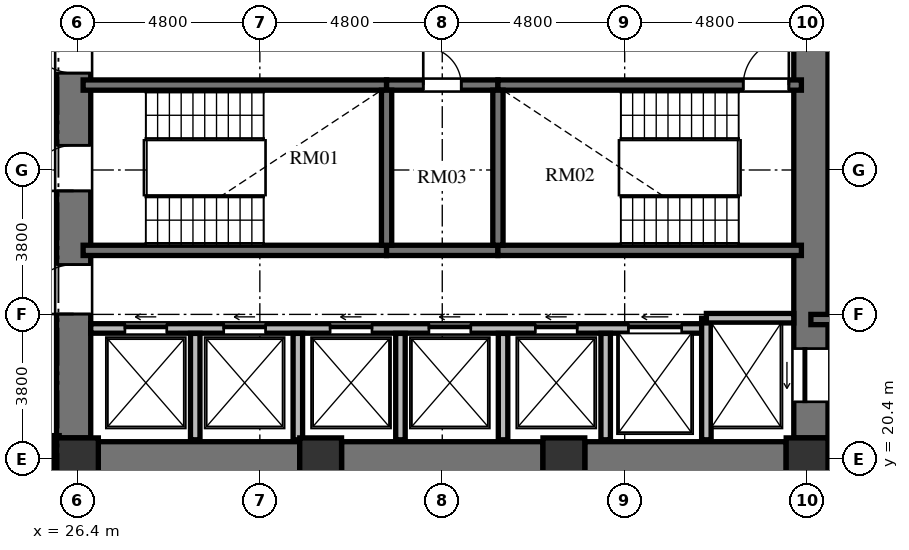
"""IFC4 building model, lengths in metres.
Left out: names, types, materials, properties, quantities, classifications, styles, units other than length and angle.
Written with IfcOpenShell. Run it as: python <this file> out.ifc"""

import sys

from ifc_helpers import new_model, si_unit, direction, frame, frame_2d, origin, origin_2d, place, context, subcontext, project, spatial, rectangle, extrude, element, fill, save


model = new_model("IFC4")
c1 = context("Model", 3, precision=1e-05, world=origin(), true_north=direction((0.0, 1.0)))
c2 = subcontext(c1, "Body", "Model", "MODEL_VIEW")
j1 = project(units=[si_unit("LENGTHUNIT", "METRE"), si_unit("PLANEANGLEUNIT", "RADIAN")], contexts=[c1])
p1 = place(None, origin())
s1 = spatial("IfcSite", under=j1, at=p1, CompositionType="ELEMENT")
p2 = place(p1, origin())
s2 = spatial("IfcBuilding", under=s1, at=p2, CompositionType="ELEMENT")
p3 = place(p2, frame((0.0, 0.0, 47.088)))
s3 = spatial("IfcBuildingStorey", under=s2, at=p3, CompositionType="ELEMENT", Elevation=47.088)
for number, where, z_axis, x_axis in (
    (1, (26.4, 20.4, 0.0), (0.0, 0.0, 1.0), (1.0, 0.0, 0.0)),
    (2, (32.8, 20.4, 0.0), (0.0, 0.0, 1.0), (1.0, 0.0, 0.0)),
    (3, (39.2, 20.4, 0.0), (0.0, 0.0, 1.0), (1.0, 0.0, 0.0)),
    (4, (45.6, 20.4, 0.0), (0.0, 0.0, 1.0), (1.0, 0.0, 0.0)),
):
    element("IfcColumn", number, at=place(p3, frame(where, z_axis=z_axis, x_axis=x_axis)), inside=s3, PredefinedType="COLUMN", context=c2, shape_type="SweptSolid", body=[
        extrude(rectangle(XDim=1.1, YDim=1.1, at=origin_2d()), origin(), (0.0, 0.0, 1.0), 3.648),
    ])
p4 = place(p3, frame((26.3, 20.95, 0.0), z_axis=(0.0, 0.0, 1.0), x_axis=(0.0, 1.0, 0.0)))
e5 = element("IfcWall", 5, at=p4, inside=s3, PredefinedType="SHEAR", context=c2, shape_type="SweptSolid", body=[
    extrude(rectangle(XDim=14.1, YDim=0.9, at=frame_2d((7.05, 0.0))), origin(), (0.0, 0.0, 1.0), 3.648),
])
p5 = place(p4, frame((6.5, 0.0, 0.0)))
e6 = element("IfcOpeningElement", 6, at=p5, cuts=e5, PredefinedType="OPENING", context=c2, shape_type="SweptSolid", body=[
    extrude(rectangle(XDim=1.2, YDim=2.15, at=frame_2d((0.6, 1.075))), frame((0.0, 0.46, 0.0), z_axis=(0.0, -1.0, 0.0), x_axis=(1.0, 0.0, 0.0)), (0.0, 0.0, 1.0), 0.92),
])
p6 = place(p4, frame((9.6, 0.0, 0.0)))
e7 = element("IfcOpeningElement", 7, at=p6, cuts=e5, PredefinedType="OPENING", context=c2, shape_type="SweptSolid", body=[
    extrude(rectangle(XDim=1.3, YDim=2.2, at=frame_2d((0.65, 1.1))), frame((0.0, 0.46, 0.0), z_axis=(0.0, -1.0, 0.0), x_axis=(1.0, 0.0, 0.0)), (0.0, 0.0, 1.0), 0.92),
])
p7 = place(p4, frame((3.26, 0.0, 0.0)))
e8 = element("IfcOpeningElement", 8, at=p7, cuts=e5, PredefinedType="OPENING", context=c2, shape_type="SweptSolid", body=[
    extrude(rectangle(XDim=1.3, YDim=2.2, at=frame_2d((0.65, 1.1))), frame((0.0, 0.46, 0.0), z_axis=(0.0, -1.0, 0.0), x_axis=(1.0, 0.0, 0.0)), (0.0, 0.0, 1.0), 0.92),
])
p8 = place(p3, frame((45.7, 20.95, 0.0), z_axis=(0.0, 0.0, 1.0), x_axis=(0.0, 1.0, 0.0)))
e9 = element("IfcWall", 9, at=p8, inside=s3, PredefinedType="SHEAR", context=c2, shape_type="SweptSolid", body=[
    extrude(rectangle(XDim=14.1, YDim=0.9, at=frame_2d((7.05, 0.0))), origin(), (0.0, 0.0, 1.0), 3.648),
])
p9 = place(p8, frame((11.75, 0.0, 0.0)))
e10 = element("IfcOpeningElement", 10, at=p9, cuts=e9, PredefinedType="OPENING", context=c2, shape_type="SweptSolid", body=[
    extrude(rectangle(XDim=1.4, YDim=2.3, at=frame_2d((0.7, 1.15))), frame((0.0, 0.46, 0.0), z_axis=(0.0, -1.0, 0.0), x_axis=(1.0, 0.0, 0.0)), (0.0, 0.0, 1.0), 0.92),
])
p10 = place(p8, frame((0.95, 0.0, 0.0)))
e11 = element("IfcOpeningElement", 11, at=p10, cuts=e9, PredefinedType="OPENING", context=c2, shape_type="SweptSolid", body=[
    extrude(rectangle(XDim=1.4, YDim=2.3, at=frame_2d((0.7, 1.15))), frame((0.0, 0.46, 0.0), z_axis=(0.0, -1.0, 0.0), x_axis=(1.0, 0.0, 0.0)), (0.0, 0.0, 1.0), 0.92),
])
p11 = place(p3, frame((26.95, 20.4, 0.0), z_axis=(0.0, 0.0, 1.0), x_axis=(1.0, 0.0, 0.0)))
e12 = element("IfcWall", 12, at=p11, inside=s3, PredefinedType="SHEAR", context=c2, shape_type="SweptSolid", body=[
    extrude(rectangle(XDim=5.3, YDim=0.9, at=frame_2d((2.65, 0.0))), origin(), (0.0, 0.0, 1.0), 3.648),
])
p12 = place(p3, frame((33.35, 20.4, 0.0), z_axis=(0.0, 0.0, 1.0), x_axis=(1.0, 0.0, 0.0)))
e13 = element("IfcWall", 13, at=p12, inside=s3, PredefinedType="SHEAR", context=c2, shape_type="SweptSolid", body=[
    extrude(rectangle(XDim=5.3, YDim=0.9, at=frame_2d((2.65, 0.0))), origin(), (0.0, 0.0, 1.0), 3.648),
])
p13 = place(p3, frame((39.75, 20.4, 0.0), z_axis=(0.0, 0.0, 1.0), x_axis=(1.0, 0.0, 0.0)))
e14 = element("IfcWall", 14, at=p13, inside=s3, PredefinedType="SHEAR", context=c2, shape_type="SweptSolid", body=[
    extrude(rectangle(XDim=5.3, YDim=0.9, at=frame_2d((2.65, 0.0))), origin(), (0.0, 0.0, 1.0), 3.648),
])
p14 = place(p3, frame((26.55, 30.235, 0.0), z_axis=(0.0, 0.0, 1.0), x_axis=(1.0, 0.0, 0.0)))
e15 = element("IfcWall", 15, at=p14, inside=s3, PredefinedType="SHEAR", context=c2, shape_type="SweptSolid", body=[
    extrude(rectangle(XDim=7.985, YDim=0.27, at=frame_2d((3.992, 0.0))), origin(), (0.0, 0.0, 1.0), 3.648),
])
p15 = place(p3, frame((34.535, 30.235, 0.0), z_axis=(0.0, 0.0, 1.0), x_axis=(1.0, 0.0, 0.0)))
e16 = element("IfcWall", 16, at=p15, inside=s3, PredefinedType="SHEAR", context=c2, shape_type="SweptSolid", body=[
    extrude(rectangle(XDim=2.93, YDim=0.27, at=frame_2d((1.465, 0.0))), origin(), (0.0, 0.0, 1.0), 3.648),
])
p16 = place(p15, frame((0.965, 0.0, 0.0)))
e17 = element("IfcOpeningElement", 17, at=p16, cuts=e16, PredefinedType="OPENING", context=c2, shape_type="SweptSolid", body=[
    extrude(rectangle(XDim=1.0, YDim=2.1, at=frame_2d((0.5, 1.05))), frame((0.0, 0.145, 0.0), z_axis=(0.0, -1.0, 0.0), x_axis=(1.0, 0.0, 0.0)), (0.0, 0.0, 1.0), 0.29),
])
p17 = place(p3, frame((37.465, 30.235, 0.0), z_axis=(0.0, 0.0, 1.0), x_axis=(1.0, 0.0, 0.0)))
e18 = element("IfcWall", 18, at=p17, inside=s3, PredefinedType="SHEAR", context=c2, shape_type="SweptSolid", body=[
    extrude(rectangle(XDim=7.985, YDim=0.27, at=frame_2d((3.992, 0.0))), origin(), (0.0, 0.0, 1.0), 3.648),
])
p18 = place(p17, frame((6.455, 0.0, 0.0)))
e19 = element("IfcOpeningElement", 19, at=p18, cuts=e18, PredefinedType="OPENING", context=c2, shape_type="SweptSolid", body=[
    extrude(rectangle(XDim=1.2, YDim=2.15, at=frame_2d((0.6, 1.075))), frame((0.0, 0.145, 0.0), z_axis=(0.0, -1.0, 0.0), x_axis=(1.0, 0.0, 0.0)), (0.0, 0.0, 1.0), 0.29),
])
p19 = place(p3, frame((26.55, 25.885, 0.0), z_axis=(0.0, 0.0, 1.0), x_axis=(1.0, 0.0, 0.0)))
e20 = element("IfcWall", 20, at=p19, inside=s3, PredefinedType="SHEAR", context=c2, shape_type="SweptSolid", body=[
    extrude(rectangle(XDim=7.985, YDim=0.27, at=frame_2d((3.992, 0.0))), origin(), (0.0, 0.0, 1.0), 3.648),
])
p20 = place(p3, frame((34.535, 25.885, 0.0), z_axis=(0.0, 0.0, 1.0), x_axis=(1.0, 0.0, 0.0)))
e21 = element("IfcWall", 21, at=p20, inside=s3, PredefinedType="SHEAR", context=c2, shape_type="SweptSolid", body=[
    extrude(rectangle(XDim=2.93, YDim=0.27, at=frame_2d((1.465, 0.0))), origin(), (0.0, 0.0, 1.0), 3.648),
])
p21 = place(p3, frame((37.465, 25.885, 0.0), z_axis=(0.0, 0.0, 1.0), x_axis=(1.0, 0.0, 0.0)))
e22 = element("IfcWall", 22, at=p21, inside=s3, PredefinedType="SHEAR", context=c2, shape_type="SweptSolid", body=[
    extrude(rectangle(XDim=7.985, YDim=0.27, at=frame_2d((3.992, 0.0))), origin(), (0.0, 0.0, 1.0), 3.648),
])
for number, where, z_axis, x_axis in (
    (23, (34.535, 26.02, 0.0), (0.0, 0.0, 1.0), (0.0, 1.0, 0.0)),
    (24, (37.465, 26.02, 0.0), (0.0, 0.0, 1.0), (0.0, 1.0, 0.0)),
):
    element("IfcWall", number, at=place(p3, frame(where, z_axis=z_axis, x_axis=x_axis)), inside=s3, PredefinedType="SHEAR", context=c2, shape_type="SweptSolid", body=[
        extrude(rectangle(XDim=4.08, YDim=0.27, at=frame_2d((2.04, 0.0))), origin(), (0.0, 0.0, 1.0), 3.648),
    ])
p22 = place(p3, frame((26.75, 23.83, 0.0), z_axis=(0.0, 0.0, 1.0), x_axis=(1.0, 0.0, 0.0)))
e25 = element("IfcWall", 25, at=p22, inside=s3, PredefinedType="SOLIDWALL", context=c2, shape_type="SweptSolid", body=[
    extrude(rectangle(XDim=16.2, YDim=0.25, at=frame_2d((8.1, 0.0))), origin(), (0.0, 0.0, 1.0), 3.428),
])
p23 = place(p22, frame((0.9, 0.0, 0.0)))
e26 = element("IfcOpeningElement", 26, at=p23, cuts=e25, PredefinedType="OPENING", context=c2, shape_type="SweptSolid", body=[
    extrude(rectangle(XDim=1.1, YDim=2.2, at=frame_2d((0.55, 1.1))), frame((0.0, 0.135, 0.0), z_axis=(0.0, -1.0, 0.0), x_axis=(1.0, 0.0, 0.0)), (0.0, 0.0, 1.0), 0.27),
])
p24 = place(p22, frame((3.5, 0.0, 0.0)))
e27 = element("IfcOpeningElement", 27, at=p24, cuts=e25, PredefinedType="OPENING", context=c2, shape_type="SweptSolid", body=[
    extrude(rectangle(XDim=1.1, YDim=2.2, at=frame_2d((0.55, 1.1))), frame((0.0, 0.135, 0.0), z_axis=(0.0, -1.0, 0.0), x_axis=(1.0, 0.0, 0.0)), (0.0, 0.0, 1.0), 0.27),
])
p25 = place(p22, frame((6.3, 0.0, 0.0)))
e28 = element("IfcOpeningElement", 28, at=p25, cuts=e25, PredefinedType="OPENING", context=c2, shape_type="SweptSolid", body=[
    extrude(rectangle(XDim=1.1, YDim=2.2, at=frame_2d((0.55, 1.1))), frame((0.0, 0.135, 0.0), z_axis=(0.0, -1.0, 0.0), x_axis=(1.0, 0.0, 0.0)), (0.0, 0.0, 1.0), 0.27),
])
p26 = place(p22, frame((8.9, 0.0, 0.0)))
e29 = element("IfcOpeningElement", 29, at=p26, cuts=e25, PredefinedType="OPENING", context=c2, shape_type="SweptSolid", body=[
    extrude(rectangle(XDim=1.1, YDim=2.2, at=frame_2d((0.55, 1.1))), frame((0.0, 0.135, 0.0), z_axis=(0.0, -1.0, 0.0), x_axis=(1.0, 0.0, 0.0)), (0.0, 0.0, 1.0), 0.27),
])
p27 = place(p22, frame((11.7, 0.0, 0.0)))
e30 = element("IfcOpeningElement", 30, at=p27, cuts=e25, PredefinedType="OPENING", context=c2, shape_type="SweptSolid", body=[
    extrude(rectangle(XDim=1.1, YDim=2.2, at=frame_2d((0.55, 1.1))), frame((0.0, 0.135, 0.0), z_axis=(0.0, -1.0, 0.0), x_axis=(1.0, 0.0, 0.0)), (0.0, 0.0, 1.0), 0.27),
])
p28 = place(p22, frame((14.15, 0.0, 0.0)))
e31 = element("IfcOpeningElement", 31, at=p28, cuts=e25, PredefinedType="OPENING", context=c2, shape_type="SweptSolid", body=[
    extrude(rectangle(XDim=1.4, YDim=2.3, at=frame_2d((0.7, 1.15))), frame((0.0, 0.135, 0.0), z_axis=(0.0, -1.0, 0.0), x_axis=(1.0, 0.0, 0.0)), (0.0, 0.0, 1.0), 0.27),
])
p29 = place(p3, frame((42.95, 20.9, 0.0), z_axis=(0.0, 0.0, 1.0), x_axis=(0.0, 1.0, 0.0)))
e32 = element("IfcWall", 32, at=p29, inside=s3, PredefinedType="SOLIDWALL", context=c2, shape_type="SweptSolid", body=[
    extrude(rectangle(XDim=3.2, YDim=0.25, at=frame_2d((1.6, 0.0))), origin(), (0.0, 0.0, 1.0), 3.428),
])
p30 = place(p3, frame((42.95, 24.1, 0.0), z_axis=(0.0, 0.0, 1.0), x_axis=(1.0, 0.0, 0.0)))
e33 = element("IfcWall", 33, at=p30, inside=s3, PredefinedType="SOLIDWALL", context=c2, shape_type="SweptSolid", body=[
    extrude(rectangle(XDim=2.3, YDim=0.25, at=frame_2d((1.15, 0.0))), origin(), (0.0, 0.0, 1.0), 3.428),
])
for number, where, z_axis, x_axis in (
    (34, (29.5, 20.9, 0.0), (0.0, 0.0, 1.0), (0.0, 1.0, 0.0)),
    (35, (32.2, 20.9, 0.0), (0.0, 0.0, 1.0), (0.0, 1.0, 0.0)),
    (36, (34.9, 20.9, 0.0), (0.0, 0.0, 1.0), (0.0, 1.0, 0.0)),
    (37, (37.6, 20.9, 0.0), (0.0, 0.0, 1.0), (0.0, 1.0, 0.0)),
    (38, (40.3, 20.9, 0.0), (0.0, 0.0, 1.0), (0.0, 1.0, 0.0)),
):
    element("IfcWall", number, at=place(p3, frame(where, z_axis=z_axis, x_axis=x_axis)), inside=s3, PredefinedType="SOLIDWALL", context=c2, shape_type="SweptSolid", body=[
        extrude(rectangle(XDim=2.8, YDim=0.25, at=frame_2d((1.4, 0.0))), origin(), (0.0, 0.0, 1.0), 3.428),
    ])
p31 = place(p3, frame((45.7, 24.065, 0.0), z_axis=(0.0, 0.0, 1.0), x_axis=(1.0, 0.0, 0.0)))
e39 = element("IfcWall", 39, at=p31, inside=s3, PredefinedType="SHEAR", context=c2, shape_type="SweptSolid", body=[
    extrude(rectangle(XDim=4.715, YDim=0.27, at=frame_2d((2.357, 0.0))), origin(), (0.0, 0.0, 1.0), 3.648),
])
p32 = place(p3, frame((45.7, 20.02, 0.0), z_axis=(0.0, 0.0, 1.0), x_axis=(1.0, 0.0, 0.0)))
e40 = element("IfcWall", 40, at=p32, inside=s3, PredefinedType="SOLIDWALL", context=c2, shape_type="SweptSolid", body=[
    extrude(rectangle(XDim=4.715, YDim=0.25, at=frame_2d((2.357, 0.0))), origin(), (0.0, 0.0, 1.0), 2.813),
])
p33 = place(p3, frame((25.83, 21.01, 0.0), z_axis=(0.0, 0.0, 1.0), x_axis=(0.0, -1.0, 0.0)))
e41 = element("IfcWall", 41, at=p33, inside=s3, PredefinedType="PARTITIONING", context=c2, shape_type="SweptSolid", body=[
    extrude(rectangle(XDim=1.22, YDim=0.18, at=frame_2d((0.61, 0.0))), origin(), (0.0, 0.0, 1.0), 3.428),
])
p34 = place(p5, origin())
e42 = element("IfcDoor", 42, at=p34, inside=s3, OperationType="SINGLE_SWING_LEFT", PredefinedType="DOOR", context=c2, shape_type="SweptSolid", body=[
    extrude(rectangle(XDim=1.2, YDim=2.15, at=frame_2d((0.6, 1.075))), frame((0.0, 0.025, 0.0), z_axis=(0.0, -1.0, 0.0), x_axis=(1.0, 0.0, 0.0)), (0.0, 0.0, 1.0), 0.05),
])
fill(e6, e42)
p35 = place(p18, origin())
e43 = element("IfcDoor", 43, at=p35, inside=s3, OperationType="SINGLE_SWING_RIGHT", PredefinedType="DOOR", context=c2, shape_type="SweptSolid", body=[
    extrude(rectangle(XDim=1.2, YDim=2.15, at=frame_2d((0.6, 1.075))), frame((0.0, 0.025, 0.0), z_axis=(0.0, -1.0, 0.0), x_axis=(1.0, 0.0, 0.0)), (0.0, 0.0, 1.0), 0.05),
])
fill(e19, e43)
p36 = place(p16, origin())
e44 = element("IfcDoor", 44, at=p36, inside=s3, OperationType="SINGLE_SWING_LEFT", PredefinedType="DOOR", context=c2, shape_type="SweptSolid", body=[
    extrude(rectangle(XDim=1.0, YDim=2.1, at=frame_2d((0.5, 1.05))), frame((0.0, 0.025, 0.0), z_axis=(0.0, -1.0, 0.0), x_axis=(1.0, 0.0, 0.0)), (0.0, 0.0, 1.0), 0.05),
])
fill(e17, e44)
p37 = place(p6, origin())
e45 = element("IfcDoor", 45, at=p37, inside=s3, OperationType="SINGLE_SWING_RIGHT", PredefinedType="DOOR", context=c2, shape_type="SweptSolid", body=[
    extrude(rectangle(XDim=1.3, YDim=2.2, at=frame_2d((0.65, 1.1))), frame((0.0, 0.025, 0.0), z_axis=(0.0, -1.0, 0.0), x_axis=(1.0, 0.0, 0.0)), (0.0, 0.0, 1.0), 0.05),
])
fill(e7, e45)
p38 = place(p7, origin())
e46 = element("IfcDoor", 46, at=p38, inside=s3, OperationType="SINGLE_SWING_LEFT", PredefinedType="DOOR", context=c2, shape_type="SweptSolid", body=[
    extrude(rectangle(XDim=1.3, YDim=2.2, at=frame_2d((0.65, 1.1))), frame((0.0, 0.025, 0.0), z_axis=(0.0, -1.0, 0.0), x_axis=(1.0, 0.0, 0.0)), (0.0, 0.0, 1.0), 0.05),
])
fill(e8, e46)
p39 = place(p23, origin())
e47 = element("IfcDoor", 47, at=p39, inside=s3, OperationType="SLIDING_TO_LEFT", PredefinedType="DOOR", context=c2, shape_type="SweptSolid", body=[
    extrude(rectangle(XDim=1.1, YDim=2.2, at=frame_2d((0.55, 1.1))), frame((0.0, 0.025, 0.0), z_axis=(0.0, -1.0, 0.0), x_axis=(1.0, 0.0, 0.0)), (0.0, 0.0, 1.0), 0.05),
])
fill(e26, e47)
p40 = place(p24, origin())
e48 = element("IfcDoor", 48, at=p40, inside=s3, OperationType="SLIDING_TO_LEFT", PredefinedType="DOOR", context=c2, shape_type="SweptSolid", body=[
    extrude(rectangle(XDim=1.1, YDim=2.2, at=frame_2d((0.55, 1.1))), frame((0.0, 0.025, 0.0), z_axis=(0.0, -1.0, 0.0), x_axis=(1.0, 0.0, 0.0)), (0.0, 0.0, 1.0), 0.05),
])
fill(e27, e48)
p41 = place(p25, origin())
e49 = element("IfcDoor", 49, at=p41, inside=s3, OperationType="SLIDING_TO_LEFT", PredefinedType="DOOR", context=c2, shape_type="SweptSolid", body=[
    extrude(rectangle(XDim=1.1, YDim=2.2, at=frame_2d((0.55, 1.1))), frame((0.0, 0.025, 0.0), z_axis=(0.0, -1.0, 0.0), x_axis=(1.0, 0.0, 0.0)), (0.0, 0.0, 1.0), 0.05),
])
fill(e28, e49)
p42 = place(p26, origin())
e50 = element("IfcDoor", 50, at=p42, inside=s3, OperationType="SLIDING_TO_LEFT", PredefinedType="DOOR", context=c2, shape_type="SweptSolid", body=[
    extrude(rectangle(XDim=1.1, YDim=2.2, at=frame_2d((0.55, 1.1))), frame((0.0, 0.025, 0.0), z_axis=(0.0, -1.0, 0.0), x_axis=(1.0, 0.0, 0.0)), (0.0, 0.0, 1.0), 0.05),
])
fill(e29, e50)
p43 = place(p27, origin())
e51 = element("IfcDoor", 51, at=p43, inside=s3, OperationType="SLIDING_TO_LEFT", PredefinedType="DOOR", context=c2, shape_type="SweptSolid", body=[
    extrude(rectangle(XDim=1.1, YDim=2.2, at=frame_2d((0.55, 1.1))), frame((0.0, 0.025, 0.0), z_axis=(0.0, -1.0, 0.0), x_axis=(1.0, 0.0, 0.0)), (0.0, 0.0, 1.0), 0.05),
])
fill(e30, e51)
p44 = place(p10, origin())
e52 = element("IfcDoor", 52, at=p44, inside=s3, OperationType="SLIDING_TO_LEFT", PredefinedType="DOOR", context=c2, shape_type="SweptSolid", body=[
    extrude(rectangle(XDim=1.4, YDim=2.3, at=frame_2d((0.7, 1.15))), frame((0.0, 0.025, 0.0), z_axis=(0.0, -1.0, 0.0), x_axis=(1.0, 0.0, 0.0)), (0.0, 0.0, 1.0), 0.05),
])
fill(e11, e52)
p45 = place(p28, origin())
e53 = element("IfcDoor", 53, at=p45, inside=s3, OperationType="SLIDING_TO_LEFT", PredefinedType="DOOR", context=c2, shape_type="SweptSolid", body=[
    extrude(rectangle(XDim=1.4, YDim=2.3, at=frame_2d((0.7, 1.15))), frame((0.0, 0.025, 0.0), z_axis=(0.0, -1.0, 0.0), x_axis=(1.0, 0.0, 0.0)), (0.0, 0.0, 1.0), 0.05),
])
fill(e31, e53)
save(model, sys.argv[1])
